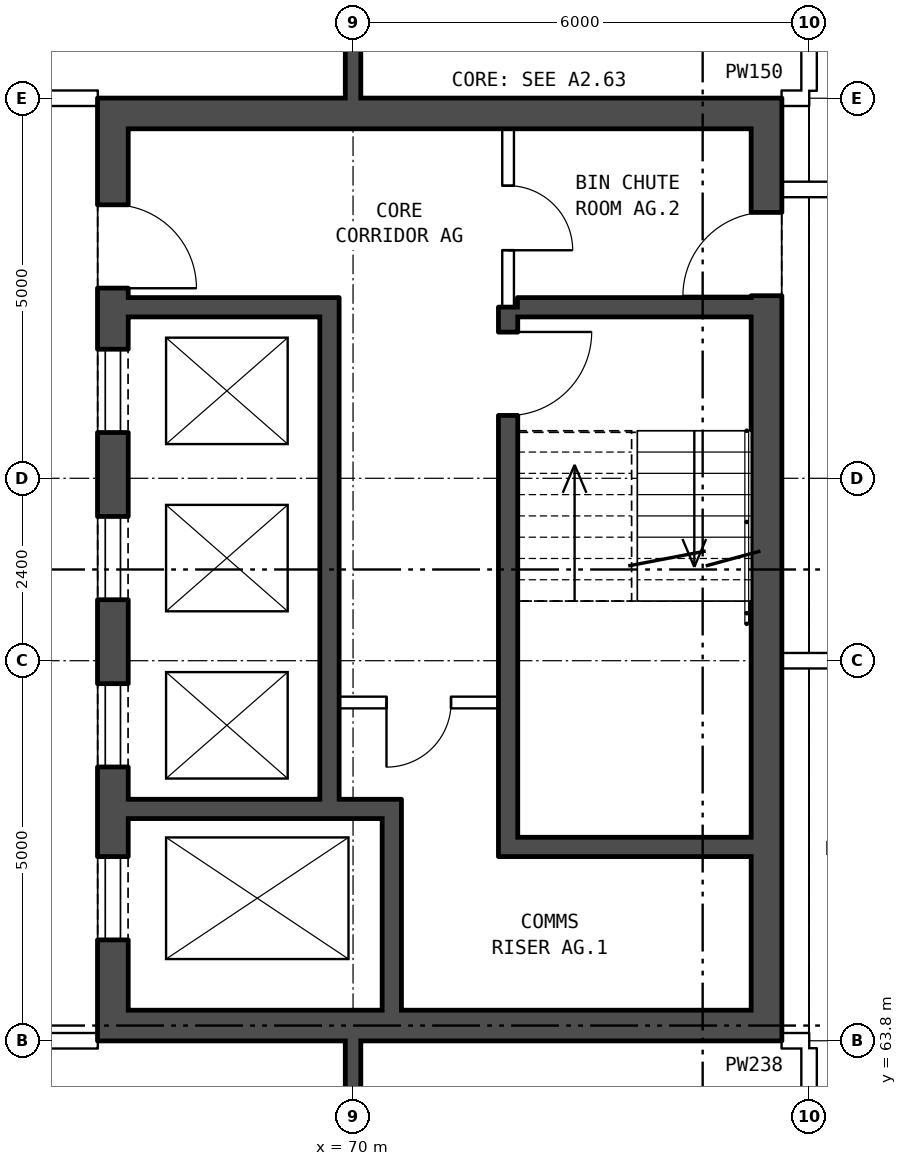
"""IFC4 building model, lengths in metres.
Left out: names, types, materials, properties, quantities, classifications, styles, units other than length and angle.
Written with IfcOpenShell. Run it as: python <this file> out.ifc"""

import sys

from ifc_helpers import new_model, si_unit, direction, frame, frame_2d, origin, place, context, subcontext, project, spatial, rectangle, extrude, element, fill, save


model = new_model("IFC4")
c1 = context("Model", 3, precision=1e-05, world=origin(), true_north=direction((0.0, 1.0)))
c2 = subcontext(c1, "Body", "Model", "MODEL_VIEW")
j1 = project(units=[si_unit("LENGTHUNIT", "METRE"), si_unit("PLANEANGLEUNIT", "RADIAN")], contexts=[c1])
p1 = place(None, origin())
s1 = spatial("IfcSite", under=j1, at=p1, CompositionType="ELEMENT")
p2 = place(p1, origin())
s2 = spatial("IfcBuilding", under=s1, at=p2, CompositionType="ELEMENT")
p3 = place(p2, frame((0.0, 0.0, 221.4)))
s3 = spatial("IfcBuildingStorey", under=s2, at=p3, CompositionType="ELEMENT", Elevation=221.4)
p4 = place(p3, frame((66.84, 63.8, 0.0), z_axis=(0.0, 0.0, 1.0), x_axis=(0.0, 1.0, 0.0)))
e1 = element("IfcWall", 1, at=p4, inside=s3, PredefinedType="SHEAR", context=c2, shape_type="SweptSolid", body=[
    extrude(rectangle(XDim=12.4, YDim=0.4, at=frame_2d((6.2, 0.0))), origin(), (0.0, 0.0, 1.0), 2.85),
])
p5 = place(p4, frame((1.325, 0.0, 0.0)))
e2 = element("IfcOpeningElement", 2, at=p5, cuts=e1, PredefinedType="OPENING", context=c2, shape_type="SweptSolid", body=[
    extrude(rectangle(XDim=1.1, YDim=2.1, at=frame_2d((0.55, 1.05))), frame((0.0, 0.21, 0.0), z_axis=(0.0, -1.0, 0.0), x_axis=(1.0, 0.0, 0.0)), (0.0, 0.0, 1.0), 0.42),
])
p6 = place(p4, frame((3.6, 0.0, 0.0)))
e3 = element("IfcOpeningElement", 3, at=p6, cuts=e1, PredefinedType="OPENING", context=c2, shape_type="SweptSolid", body=[
    extrude(rectangle(XDim=1.1, YDim=2.1, at=frame_2d((0.55, 1.05))), frame((0.0, 0.21, 0.0), z_axis=(0.0, -1.0, 0.0), x_axis=(1.0, 0.0, 0.0)), (0.0, 0.0, 1.0), 0.42),
])
p7 = place(p4, frame((5.8, 0.0, 0.0)))
e4 = element("IfcOpeningElement", 4, at=p7, cuts=e1, PredefinedType="OPENING", context=c2, shape_type="SweptSolid", body=[
    extrude(rectangle(XDim=1.1, YDim=2.1, at=frame_2d((0.55, 1.05))), frame((0.0, 0.21, 0.0), z_axis=(0.0, -1.0, 0.0), x_axis=(1.0, 0.0, 0.0)), (0.0, 0.0, 1.0), 0.42),
])
p8 = place(p4, frame((8.0, 0.0, 0.0)))
e5 = element("IfcOpeningElement", 5, at=p8, cuts=e1, PredefinedType="OPENING", context=c2, shape_type="SweptSolid", body=[
    extrude(rectangle(XDim=1.1, YDim=2.1, at=frame_2d((0.55, 1.05))), frame((0.0, 0.21, 0.0), z_axis=(0.0, -1.0, 0.0), x_axis=(1.0, 0.0, 0.0)), (0.0, 0.0, 1.0), 0.42),
])
p9 = place(p4, frame((9.9, 0.0, 0.0)))
e6 = element("IfcOpeningElement", 6, at=p9, cuts=e1, PredefinedType="OPENING", context=c2, shape_type="SweptSolid", body=[
    extrude(rectangle(XDim=1.1, YDim=2.1, at=frame_2d((0.55, 1.05))), frame((0.0, 0.21, 0.0), z_axis=(0.0, -1.0, 0.0), x_axis=(1.0, 0.0, 0.0)), (0.0, 0.0, 1.0), 0.42),
])
p10 = place(p3, frame((75.44, 63.8, 0.0), z_axis=(0.0, 0.0, 1.0), x_axis=(0.0, 1.0, 0.0)))
e7 = element("IfcWall", 7, at=p10, inside=s3, PredefinedType="SHEAR", context=c2, shape_type="SweptSolid", body=[
    extrude(rectangle(XDim=12.4, YDim=0.4, at=frame_2d((6.2, 0.0))), origin(), (0.0, 0.0, 1.0), 2.85),
])
p11 = place(p10, frame((9.8, 0.0, 0.0)))
e8 = element("IfcOpeningElement", 8, at=p11, cuts=e7, PredefinedType="OPENING", context=c2, shape_type="SweptSolid", body=[
    extrude(rectangle(XDim=1.1, YDim=2.1, at=frame_2d((0.55, 1.05))), frame((0.0, 0.21, 0.0), z_axis=(0.0, -1.0, 0.0), x_axis=(1.0, 0.0, 0.0)), (0.0, 0.0, 1.0), 0.42),
])
for number, where, z_axis, x_axis in (
    (9, (67.04, 64.0, 0.0), (0.0, 0.0, 1.0), (1.0, 0.0, 0.0)),
    (10, (67.04, 76.0, 0.0), (0.0, 0.0, 1.0), (1.0, 0.0, 0.0)),
):
    element("IfcWall", number, at=place(p3, frame(where, z_axis=z_axis, x_axis=x_axis)), inside=s3, PredefinedType="SHEAR", context=c2, shape_type="SweptSolid", body=[
        extrude(rectangle(XDim=8.2, YDim=0.4, at=frame_2d((4.1, 0.0))), origin(), (0.0, 0.0, 1.0), 2.85),
    ])
p12 = place(p3, frame((72.165, 66.35, 0.0), z_axis=(0.0, 0.0, 1.0), x_axis=(1.0, 0.0, 0.0)))
e11 = element("IfcWall", 11, at=p12, inside=s3, PredefinedType="SHEAR", context=c2, shape_type="SweptSolid", body=[
    extrude(rectangle(XDim=3.075, YDim=0.25, at=frame_2d((1.538, 0.0))), origin(), (0.0, 0.0, 1.0), 2.85),
])
p13 = place(p3, frame((67.04, 66.85, 0.0), z_axis=(0.0, 0.0, 1.0), x_axis=(1.0, 0.0, 0.0)))
e12 = element("IfcWall", 12, at=p13, inside=s3, PredefinedType="SHEAR", context=c2, shape_type="SweptSolid", body=[
    extrude(rectangle(XDim=3.595, YDim=0.25, at=frame_2d((1.797, 0.0))), origin(), (0.0, 0.0, 1.0), 2.85),
])
p14 = place(p3, frame((69.815, 68.25, 0.0), z_axis=(0.0, 0.0, 1.0), x_axis=(1.0, 0.0, 0.0)))
e13 = element("IfcWall", 13, at=p14, inside=s3, PredefinedType="PARTITIONING", context=c2, shape_type="SweptSolid", body=[
    extrude(rectangle(XDim=2.1, YDim=0.15, at=frame_2d((1.05, 0.0))), origin(), (0.0, 0.0, 1.0), 2.85),
])
p15 = place(p14, frame((0.625, 0.0, 0.0)))
e14 = element("IfcOpeningElement", 14, at=p15, cuts=e13, PredefinedType="OPENING", context=c2, shape_type="SweptSolid", body=[
    extrude(rectangle(XDim=0.85, YDim=2.1, at=frame_2d((0.425, 1.05))), frame((0.0, 0.085, 0.0), z_axis=(0.0, -1.0, 0.0), x_axis=(1.0, 0.0, 0.0)), (0.0, 0.0, 1.0), 0.17),
])
p16 = place(p3, frame((67.04, 73.45, 0.0), z_axis=(0.0, 0.0, 1.0), x_axis=(1.0, 0.0, 0.0)))
e15 = element("IfcWall", 15, at=p16, inside=s3, PredefinedType="SHEAR", context=c2, shape_type="SweptSolid", body=[
    extrude(rectangle(XDim=2.525, YDim=0.25, at=frame_2d((1.262, 0.0))), origin(), (0.0, 0.0, 1.0), 2.85),
])
p17 = place(p3, frame((72.165, 73.45, 0.0), z_axis=(0.0, 0.0, 1.0), x_axis=(1.0, 0.0, 0.0)))
e16 = element("IfcWall", 16, at=p17, inside=s3, PredefinedType="SHEAR", context=c2, shape_type="SweptSolid", body=[
    extrude(rectangle(XDim=3.075, YDim=0.25, at=frame_2d((1.538, 0.0))), origin(), (0.0, 0.0, 1.0), 2.85),
])
p18 = place(p3, frame((69.69, 66.975, 0.0), z_axis=(0.0, 0.0, 1.0), x_axis=(0.0, 1.0, 0.0)))
e17 = element("IfcWall", 17, at=p18, inside=s3, PredefinedType="SHEAR", context=c2, shape_type="SweptSolid", body=[
    extrude(rectangle(XDim=6.6, YDim=0.25, at=frame_2d((3.3, 0.0))), origin(), (0.0, 0.0, 1.0), 2.85),
])
p19 = place(p3, frame((70.51, 64.2, 0.0), z_axis=(0.0, 0.0, 1.0), x_axis=(0.0, 1.0, 0.0)))
e18 = element("IfcWall", 18, at=p19, inside=s3, PredefinedType="SHEAR", context=c2, shape_type="SweptSolid", body=[
    extrude(rectangle(XDim=2.525, YDim=0.25, at=frame_2d((1.263, 0.0))), origin(), (0.0, 0.0, 1.0), 2.85),
])
p20 = place(p3, frame((72.04, 66.225, 0.0), z_axis=(0.0, 0.0, 1.0), x_axis=(0.0, 1.0, 0.0)))
e19 = element("IfcWall", 19, at=p20, inside=s3, PredefinedType="SHEAR", context=c2, shape_type="SweptSolid", body=[
    extrude(rectangle(XDim=7.225, YDim=0.25, at=frame_2d((3.612, 0.0))), origin(), (0.0, 0.0, 1.0), 2.85),
])
p21 = place(p20, frame((5.8, 0.0, 0.0)))
e20 = element("IfcOpeningElement", 20, at=p21, cuts=e19, PredefinedType="OPENING", context=c2, shape_type="SweptSolid", body=[
    extrude(rectangle(XDim=1.1, YDim=2.1, at=frame_2d((0.55, 1.05))), frame((0.0, 0.135, 0.0), z_axis=(0.0, -1.0, 0.0), x_axis=(1.0, 0.0, 0.0)), (0.0, 0.0, 1.0), 0.27),
])
p22 = place(p3, frame((72.04, 73.45, 0.0), z_axis=(0.0, 0.0, 1.0), x_axis=(0.0, 1.0, 0.0)))
e21 = element("IfcWall", 21, at=p22, inside=s3, PredefinedType="PARTITIONING", context=c2, shape_type="SweptSolid", body=[
    extrude(rectangle(XDim=2.35, YDim=0.15, at=frame_2d((1.175, 0.0))), origin(), (0.0, 0.0, 1.0), 2.85),
])
p23 = place(p22, frame((0.75, 0.0, 0.0)))
e22 = element("IfcOpeningElement", 22, at=p23, cuts=e21, PredefinedType="OPENING", context=c2, shape_type="SweptSolid", body=[
    extrude(rectangle(XDim=0.85, YDim=2.1, at=frame_2d((0.425, 1.05))), frame((0.0, 0.085, 0.0), z_axis=(0.0, -1.0, 0.0), x_axis=(1.0, 0.0, 0.0)), (0.0, 0.0, 1.0), 0.17),
])
p24 = place(p3, frame((63.64, 63.8, 0.0), z_axis=(0.0, 0.0, 1.0), x_axis=(1.0, 0.0, 0.0)))
e23 = element("IfcWall", 23, at=p24, inside=s3, PredefinedType="PARTITIONING", context=c2, shape_type="SweptSolid", body=[
    extrude(rectangle(XDim=3.0, YDim=0.2, at=frame_2d((1.5, 0.0))), origin(), (0.0, 0.0, 1.0), 2.85),
])
p25 = place(p24, frame((1.18, 0.0, 0.0)))
e24 = element("IfcOpeningElement", 24, at=p25, cuts=e23, PredefinedType="OPENING", context=c2, shape_type="SweptSolid", body=[
    extrude(rectangle(XDim=1.0, YDim=2.1, at=frame_2d((0.5, 1.05))), frame((0.0, 0.11, 0.0), z_axis=(0.0, -1.0, 0.0), x_axis=(1.0, 0.0, 0.0)), (0.0, 0.0, 1.0), 0.22),
])
p26 = place(p3, frame((75.64, 63.8, 0.0), z_axis=(0.0, 0.0, 1.0), x_axis=(1.0, 0.0, 0.0)))
e25 = element("IfcWall", 25, at=p26, inside=s3, PredefinedType="PARTITIONING", context=c2, shape_type="SweptSolid", body=[
    extrude(rectangle(XDim=0.36, YDim=0.2, at=frame_2d((0.18, 0.0))), origin(), (0.0, 0.0, 1.0), 2.85),
])
p27 = place(p3, frame((75.64, 68.8, 0.0), z_axis=(0.0, 0.0, 1.0), x_axis=(1.0, 0.0, 0.0)))
e26 = element("IfcWall", 26, at=p27, inside=s3, PredefinedType="PARTITIONING", context=c2, shape_type="SweptSolid", body=[
    extrude(rectangle(XDim=55.72, YDim=0.2, at=frame_2d((27.86, 0.0))), origin(), (0.0, 0.0, 1.0), 2.85),
])
p28 = place(p27, frame((1.399, 0.0, 0.0)))
e27 = element("IfcOpeningElement", 27, at=p28, cuts=e26, PredefinedType="OPENING", context=c2, shape_type="SweptSolid", body=[
    extrude(rectangle(XDim=1.0, YDim=2.1, at=frame_2d((0.5, 1.05))), frame((0.0, 0.11, 0.0), z_axis=(0.0, -1.0, 0.0), x_axis=(1.0, 0.0, 0.0)), (0.0, 0.0, 1.0), 0.22),
])
p29 = place(p27, frame((12.241, 0.0, 0.0)))
e28 = element("IfcOpeningElement", 28, at=p29, cuts=e26, PredefinedType="OPENING", context=c2, shape_type="SweptSolid", body=[
    extrude(rectangle(XDim=1.0, YDim=2.1, at=frame_2d((0.5, 1.05))), frame((0.0, 0.11, 0.0), z_axis=(0.0, -1.0, 0.0), x_axis=(1.0, 0.0, 0.0)), (0.0, 0.0, 1.0), 0.22),
])
p30 = place(p27, frame((22.553, 0.0, 0.0)))
e29 = element("IfcOpeningElement", 29, at=p30, cuts=e26, PredefinedType="OPENING", context=c2, shape_type="SweptSolid", body=[
    extrude(rectangle(XDim=1.0, YDim=2.1, at=frame_2d((0.5, 1.05))), frame((0.0, 0.11, 0.0), z_axis=(0.0, -1.0, 0.0), x_axis=(1.0, 0.0, 0.0)), (0.0, 0.0, 1.0), 0.22),
])
p31 = place(p27, frame((32.866, 0.0, 0.0)))
e30 = element("IfcOpeningElement", 30, at=p31, cuts=e26, PredefinedType="OPENING", context=c2, shape_type="SweptSolid", body=[
    extrude(rectangle(XDim=1.0, YDim=2.1, at=frame_2d((0.5, 1.05))), frame((0.0, 0.11, 0.0), z_axis=(0.0, -1.0, 0.0), x_axis=(1.0, 0.0, 0.0)), (0.0, 0.0, 1.0), 0.22),
])
p32 = place(p27, frame((36.303, 0.0, 0.0)))
e31 = element("IfcOpeningElement", 31, at=p32, cuts=e26, PredefinedType="OPENING", context=c2, shape_type="SweptSolid", body=[
    extrude(rectangle(XDim=1.0, YDim=2.1, at=frame_2d((0.5, 1.05))), frame((0.0, 0.11, 0.0), z_axis=(0.0, -1.0, 0.0), x_axis=(1.0, 0.0, 0.0)), (0.0, 0.0, 1.0), 0.22),
])
p33 = place(p27, frame((46.616, 0.0, 0.0)))
e32 = element("IfcOpeningElement", 32, at=p33, cuts=e26, PredefinedType="OPENING", context=c2, shape_type="SweptSolid", body=[
    extrude(rectangle(XDim=1.0, YDim=2.1, at=frame_2d((0.5, 1.05))), frame((0.0, 0.11, 0.0), z_axis=(0.0, -1.0, 0.0), x_axis=(1.0, 0.0, 0.0)), (0.0, 0.0, 1.0), 0.22),
])
p34 = place(p27, frame((50.053, 0.0, 0.0)))
e33 = element("IfcOpeningElement", 33, at=p34, cuts=e26, PredefinedType="OPENING", context=c2, shape_type="SweptSolid", body=[
    extrude(rectangle(XDim=1.0, YDim=2.1, at=frame_2d((0.5, 1.05))), frame((0.0, 0.11, 0.0), z_axis=(0.0, -1.0, 0.0), x_axis=(1.0, 0.0, 0.0)), (0.0, 0.0, 1.0), 0.22),
])
p35 = place(p3, frame((75.64, 75.0, 0.0), z_axis=(0.0, 0.0, 1.0), x_axis=(1.0, 0.0, 0.0)))
e34 = element("IfcWall", 34, at=p35, inside=s3, PredefinedType="PARTITIONING", context=c2, shape_type="SweptSolid", body=[
    extrude(rectangle(XDim=7.585, YDim=0.2, at=frame_2d((3.792, 0.0))), origin(), (0.0, 0.0, 1.0), 2.85),
])
p36 = place(p35, frame((3.343, 0.0, 0.0)))
e35 = element("IfcOpeningElement", 35, at=p36, cuts=e34, PredefinedType="OPENING", context=c2, shape_type="SweptSolid", body=[
    extrude(rectangle(XDim=0.9, YDim=2.1, at=frame_2d((0.45, 1.05))), frame((0.0, 0.11, 0.0), z_axis=(0.0, -1.0, 0.0), x_axis=(1.0, 0.0, 0.0)), (0.0, 0.0, 1.0), 0.22),
])
p37 = place(p3, frame((63.64, 76.2, 0.0), z_axis=(0.0, 0.0, 1.0), x_axis=(1.0, 0.0, 0.0)))
e36 = element("IfcWall", 36, at=p37, inside=s3, PredefinedType="PARTITIONING", context=c2, shape_type="SweptSolid", body=[
    extrude(rectangle(XDim=3.0, YDim=0.2, at=frame_2d((1.5, 0.0))), origin(), (0.0, 0.0, 1.0), 2.85),
])
p38 = place(p37, frame((1.18, 0.0, 0.0)))
e37 = element("IfcOpeningElement", 37, at=p38, cuts=e36, PredefinedType="OPENING", context=c2, shape_type="SweptSolid", body=[
    extrude(rectangle(XDim=1.0, YDim=2.1, at=frame_2d((0.5, 1.05))), frame((0.0, 0.11, 0.0), z_axis=(0.0, -1.0, 0.0), x_axis=(1.0, 0.0, 0.0)), (0.0, 0.0, 1.0), 0.22),
])
p39 = place(p3, frame((75.64, 76.2, 0.0), z_axis=(0.0, 0.0, 1.0), x_axis=(1.0, 0.0, 0.0)))
e38 = element("IfcWall", 38, at=p39, inside=s3, PredefinedType="PARTITIONING", context=c2, shape_type="SweptSolid", body=[
    extrude(rectangle(XDim=0.36, YDim=0.2, at=frame_2d((0.18, 0.0))), origin(), (0.0, 0.0, 1.0), 2.85),
])
p40 = place(p3, frame((70.0, 54.36, 0.0), z_axis=(0.0, 0.0, 1.0), x_axis=(0.0, 1.0, 0.0)))
e39 = element("IfcWall", 39, at=p40, inside=s3, PredefinedType="SOLIDWALL", context=c2, shape_type="SweptSolid", body=[
    extrude(rectangle(XDim=9.44, YDim=0.2, at=frame_2d((4.72, 0.0))), origin(), (0.0, 0.0, 1.0), 2.85),
])
p41 = place(p40, frame((2.32, 0.0, 0.0)))
e40 = element("IfcOpeningElement", 40, at=p41, cuts=e39, PredefinedType="OPENING", context=c2, shape_type="SweptSolid", body=[
    extrude(rectangle(XDim=0.9, YDim=2.1, at=frame_2d((0.45, 1.05))), frame((0.0, 0.11, 0.0), z_axis=(0.0, -1.0, 0.0), x_axis=(1.0, 0.0, 0.0)), (0.0, 0.0, 1.0), 0.22),
])
p42 = place(p40, frame((7.39, 0.0, 0.0)))
e41 = element("IfcOpeningElement", 41, at=p42, cuts=e39, PredefinedType="OPENING", context=c2, shape_type="SweptSolid", body=[
    extrude(rectangle(XDim=0.8, YDim=2.1, at=frame_2d((0.4, 1.05))), frame((0.0, 0.11, 0.0), z_axis=(0.0, -1.0, 0.0), x_axis=(1.0, 0.0, 0.0)), (0.0, 0.0, 1.0), 0.22),
])
p43 = place(p3, frame((70.0, 76.2, 0.0), z_axis=(0.0, 0.0, 1.0), x_axis=(0.0, 1.0, 0.0)))
e42 = element("IfcWall", 42, at=p43, inside=s3, PredefinedType="SOLIDWALL", context=c2, shape_type="SweptSolid", body=[
    extrude(rectangle(XDim=9.44, YDim=0.2, at=frame_2d((4.72, 0.0))), origin(), (0.0, 0.0, 1.0), 2.85),
])
p44 = place(p43, frame((5.92, 0.0, 0.0)))
e43 = element("IfcOpeningElement", 43, at=p44, cuts=e42, PredefinedType="OPENING", context=c2, shape_type="SweptSolid", body=[
    extrude(rectangle(XDim=0.9, YDim=2.1, at=frame_2d((0.45, 1.05))), frame((0.0, 0.11, 0.0), z_axis=(0.0, -1.0, 0.0), x_axis=(1.0, 0.0, 0.0)), (0.0, 0.0, 1.0), 0.22),
])
p45 = place(p43, frame((1.25, 0.0, 0.0)))
e44 = element("IfcOpeningElement", 44, at=p45, cuts=e42, PredefinedType="OPENING", context=c2, shape_type="SweptSolid", body=[
    extrude(rectangle(XDim=0.8, YDim=2.1, at=frame_2d((0.4, 1.05))), frame((0.0, 0.11, 0.0), z_axis=(0.0, -1.0, 0.0), x_axis=(1.0, 0.0, 0.0)), (0.0, 0.0, 1.0), 0.22),
])
for number, where, z_axis, x_axis in (
    (45, (76.0, 54.36, 0.0), (0.0, 0.0, 1.0), (0.0, 1.0, 0.0)),
    (46, (76.0, 76.3, 0.0), (0.0, 0.0, 1.0), (0.0, 1.0, 0.0)),
):
    element("IfcWall", number, at=place(p3, frame(where, z_axis=z_axis, x_axis=x_axis)), inside=s3, PredefinedType="PARTITIONING", context=c2, shape_type="SweptSolid", body=[
        extrude(rectangle(XDim=9.34, YDim=0.2, at=frame_2d((4.67, 0.0))), origin(), (0.0, 0.0, 1.0), 2.85),
    ])
p46 = place(p5, origin())
e47 = element("IfcDoor", 47, at=p46, inside=s3, OperationType="DOUBLE_DOOR_SLIDING", PredefinedType="DOOR", context=c2, shape_type="SweptSolid", body=[
    extrude(rectangle(XDim=1.1, YDim=2.1, at=frame_2d((0.55, 1.05))), frame((0.0, -0.135, 0.0), z_axis=(0.0, -1.0, 0.0), x_axis=(1.0, 0.0, 0.0)), (0.0, 0.0, 1.0), 0.05),
])
fill(e2, e47)
p47 = place(p6, origin())
e48 = element("IfcDoor", 48, at=p47, inside=s3, OperationType="DOUBLE_DOOR_SLIDING", PredefinedType="DOOR", context=c2, shape_type="SweptSolid", body=[
    extrude(rectangle(XDim=1.1, YDim=2.1, at=frame_2d((0.55, 1.05))), frame((0.0, -0.135, 0.0), z_axis=(0.0, -1.0, 0.0), x_axis=(1.0, 0.0, 0.0)), (0.0, 0.0, 1.0), 0.05),
])
fill(e3, e48)
p48 = place(p7, origin())
e49 = element("IfcDoor", 49, at=p48, inside=s3, OperationType="DOUBLE_DOOR_SLIDING", PredefinedType="DOOR", context=c2, shape_type="SweptSolid", body=[
    extrude(rectangle(XDim=1.1, YDim=2.1, at=frame_2d((0.55, 1.05))), frame((0.0, -0.135, 0.0), z_axis=(0.0, -1.0, 0.0), x_axis=(1.0, 0.0, 0.0)), (0.0, 0.0, 1.0), 0.05),
])
fill(e4, e49)
p49 = place(p8, origin())
e50 = element("IfcDoor", 50, at=p49, inside=s3, OperationType="DOUBLE_DOOR_SLIDING", PredefinedType="DOOR", context=c2, shape_type="SweptSolid", body=[
    extrude(rectangle(XDim=1.1, YDim=2.1, at=frame_2d((0.55, 1.05))), frame((0.0, -0.135, 0.0), z_axis=(0.0, -1.0, 0.0), x_axis=(1.0, 0.0, 0.0)), (0.0, 0.0, 1.0), 0.05),
])
fill(e5, e50)
p50 = place(p9, frame((1.1, 0.0, 0.0), z_axis=(0.0, 0.0, 1.0), x_axis=(-1.0, 0.0, 0.0)))
e51 = element("IfcDoor", 51, at=p50, inside=s3, OperationType="SINGLE_SWING_RIGHT", PredefinedType="DOOR", context=c2, shape_type="SweptSolid", body=[
    extrude(rectangle(XDim=1.1, YDim=2.1, at=frame_2d((0.55, 1.05))), frame((0.0, 0.185, 0.0), z_axis=(0.0, -1.0, 0.0), x_axis=(1.0, 0.0, 0.0)), (0.0, 0.0, 1.0), 0.05),
])
fill(e6, e51)
p51 = place(p21, frame((1.1, 0.0, 0.0), z_axis=(0.0, 0.0, 1.0), x_axis=(-1.0, 0.0, 0.0)))
e52 = element("IfcDoor", 52, at=p51, inside=s3, OperationType="SINGLE_SWING_LEFT", PredefinedType="DOOR", context=c2, shape_type="SweptSolid", body=[
    extrude(rectangle(XDim=1.1, YDim=2.1, at=frame_2d((0.55, 1.05))), frame((0.0, 0.025, 0.0), z_axis=(0.0, -1.0, 0.0), x_axis=(1.0, 0.0, 0.0)), (0.0, 0.0, 1.0), 0.05),
])
fill(e20, e52)
p52 = place(p15, frame((0.85, 0.0, 0.0), z_axis=(0.0, 0.0, 1.0), x_axis=(-1.0, 0.0, 0.0)))
e53 = element("IfcDoor", 53, at=p52, inside=s3, OperationType="SINGLE_SWING_RIGHT", PredefinedType="DOOR", context=c2, shape_type="SweptSolid", body=[
    extrude(rectangle(XDim=0.85, YDim=2.1, at=frame_2d((0.425, 1.05))), frame((0.0, 0.025, 0.0), z_axis=(0.0, -1.0, 0.0), x_axis=(1.0, 0.0, 0.0)), (0.0, 0.0, 1.0), 0.05),
])
fill(e14, e53)
p53 = place(p23, frame((0.85, 0.0, 0.0), z_axis=(0.0, 0.0, 1.0), x_axis=(-1.0, 0.0, 0.0)))
e54 = element("IfcDoor", 54, at=p53, inside=s3, OperationType="SINGLE_SWING_RIGHT", PredefinedType="DOOR", context=c2, shape_type="SweptSolid", body=[
    extrude(rectangle(XDim=0.85, YDim=2.1, at=frame_2d((0.425, 1.05))), frame((0.0, 0.025, 0.0), z_axis=(0.0, -1.0, 0.0), x_axis=(1.0, 0.0, 0.0)), (0.0, 0.0, 1.0), 0.05),
])
fill(e22, e54)
p54 = place(p11, origin())
e55 = element("IfcDoor", 55, at=p54, inside=s3, OperationType="SINGLE_SWING_LEFT", PredefinedType="DOOR", context=c2, shape_type="SweptSolid", body=[
    extrude(rectangle(XDim=1.1, YDim=2.1, at=frame_2d((0.55, 1.05))), frame((0.0, 0.185, 0.0), z_axis=(0.0, -1.0, 0.0), x_axis=(1.0, 0.0, 0.0)), (0.0, 0.0, 1.0), 0.05),
])
fill(e8, e55)
save(model, sys.argv[1])
